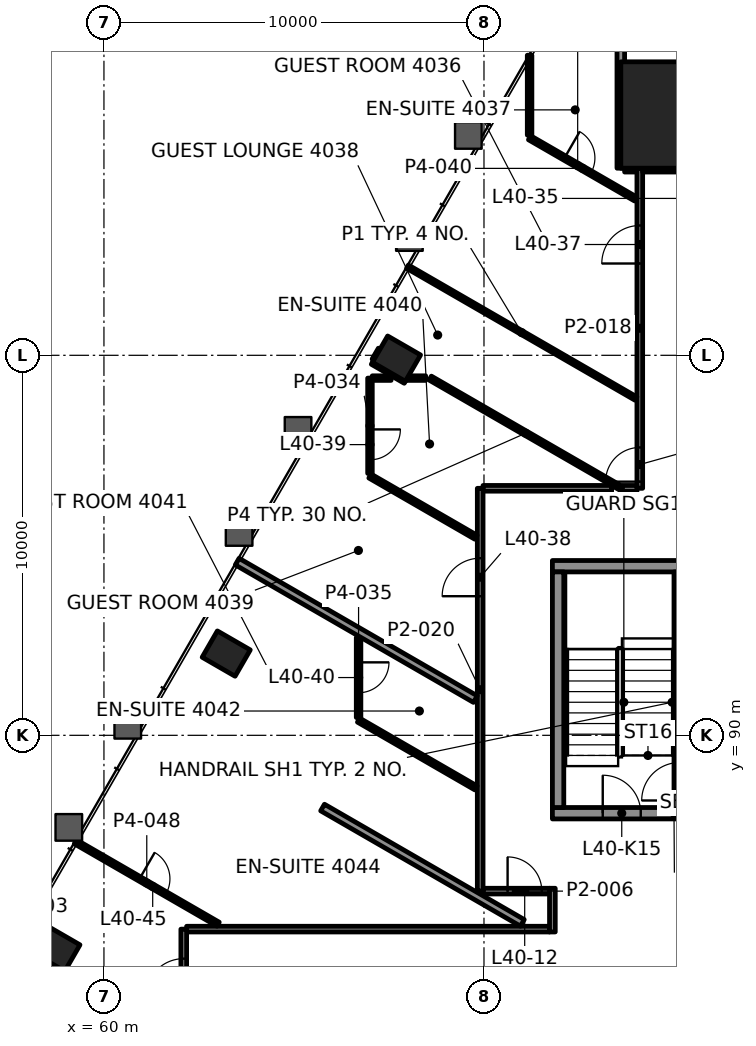
"""IFC4 building model, lengths in metres.
Left out: names, types, materials, properties, quantities, classifications, styles, units other than length and angle.
Written with IfcOpenShell. Run it as: python <this file> out.ifc"""

import sys

from ifc_helpers import new_model, si_unit, direction, frame, frame_2d, origin, origin_2d, place, context, subcontext, project, spatial, rectangle, hollow_rectangle, extrude, element, fill, save


model = new_model("IFC4")
c1 = context("Model", 3, precision=1e-05, world=origin(), true_north=direction((0.0, 1.0)))
c2 = subcontext(c1, "Body", "Model", "MODEL_VIEW")
j1 = project(units=[si_unit("LENGTHUNIT", "METRE"), si_unit("PLANEANGLEUNIT", "RADIAN")], contexts=[c1])
p1 = place(None, origin())
s1 = spatial("IfcSite", under=j1, at=p1, CompositionType="ELEMENT")
p2 = place(p1, origin())
s2 = spatial("IfcBuilding", under=s1, at=p2, CompositionType="ELEMENT")
p3 = place(p2, frame((0.0, 0.0, 175.3)))
s3 = spatial("IfcBuildingStorey", under=s2, at=p3, CompositionType="ELEMENT", Elevation=175.3)
p4 = place(p3, frame((75.0, 106.323, 0.0), z_axis=(0.0, 0.0, 1.0), x_axis=(-1.0, 0.0, 0.0)))
e1 = element("IfcColumn", 1, at=p4, inside=s3, PredefinedType="COLUMN", context=c2, shape_type="SweptSolid", body=[
    extrude(rectangle(XDim=2.8, YDim=2.8, at=origin_2d()), origin(), (0.0, 0.0, 1.0), 3.9),
])
for number, where, z_axis, x_axis in (
    (2, (67.698, 99.912, -0.0), (0.0, 0.0, 1.0), (-0.5, -0.866, 0.0)),
    (3, (63.218, 92.151, -0.0), (0.0, 0.0, 1.0), (-0.5, -0.866, 0.0)),
    (4, (58.737, 84.39, -0.0), (0.0, 0.0, 1.0), (-0.5, -0.866, 0.0)),
):
    element("IfcColumn", number, at=place(p3, frame(where, z_axis=z_axis, x_axis=x_axis)), inside=s3, PredefinedType="COLUMN", context=c2, shape_type="SweptSolid", body=[
        extrude(hollow_rectangle(XDim=0.8, YDim=1.0, WallThickness=0.05, at=origin_2d()), origin(), (0.0, 0.0, 1.0), 3.9),
    ])
p5 = place(p3, frame((71.8, 87.95, 0.0), z_axis=(0.0, 0.0, 1.0), x_axis=(1.0, 0.0, 0.0)))
e5 = element("IfcWall", 5, at=p5, inside=s3, PredefinedType="SHEAR", context=c2, shape_type="SweptSolid", body=[
    extrude(rectangle(XDim=6.4, YDim=0.3, at=frame_2d((3.2, 0.0))), origin(), (0.0, 0.0, 1.0), 3.7),
])
p6 = place(p5, frame((1.325, 0.0, 0.0)))
e6 = element("IfcOpeningElement", 6, at=p6, cuts=e5, PredefinedType="OPENING", context=c2, shape_type="SweptSolid", body=[
    extrude(rectangle(XDim=1.0, YDim=2.1, at=frame_2d((0.5, 1.05))), frame((0.0, 0.16, 0.0), z_axis=(0.0, -1.0, 0.0), x_axis=(1.0, 0.0, 0.0)), (0.0, 0.0, 1.0), 0.32),
])
p7 = place(p5, frame((4.125, 0.0, 0.0)))
e7 = element("IfcOpeningElement", 7, at=p7, cuts=e5, PredefinedType="OPENING", context=c2, shape_type="SweptSolid", body=[
    extrude(rectangle(XDim=1.2, YDim=2.1, at=frame_2d((0.6, 1.05))), frame((0.0, 0.16, 0.0), z_axis=(0.0, -1.0, 0.0), x_axis=(1.0, 0.0, 0.0)), (0.0, 0.0, 1.0), 0.32),
])
p8 = place(p3, frame((71.8, 94.45, 0.0), z_axis=(0.0, 0.0, 1.0), x_axis=(1.0, 0.0, 0.0)))
e8 = element("IfcWall", 8, at=p8, inside=s3, PredefinedType="SHEAR", context=c2, shape_type="SweptSolid", body=[
    extrude(rectangle(XDim=6.4, YDim=0.3, at=frame_2d((3.2, 0.0))), origin(), (0.0, 0.0, 1.0), 3.7),
])
p9 = place(p3, frame((71.95, 88.1, 0.0), z_axis=(0.0, 0.0, 1.0), x_axis=(0.0, 1.0, 0.0)))
e9 = element("IfcWall", 9, at=p9, inside=s3, PredefinedType="SHEAR", context=c2, shape_type="SweptSolid", body=[
    extrude(rectangle(XDim=6.2, YDim=0.3, at=frame_2d((3.1, 0.0))), origin(), (0.0, 0.0, 1.0), 3.7),
])
p10 = place(p3, frame((75.15, 88.1, 0.0), z_axis=(0.0, 0.0, 1.0), x_axis=(0.0, 1.0, 0.0)))
e10 = element("IfcWall", 10, at=p10, inside=s3, PredefinedType="SHEAR", context=c2, shape_type="SweptSolid", body=[
    extrude(rectangle(XDim=6.2, YDim=0.3, at=frame_2d((3.1, 0.0))), origin(), (0.0, 0.0, 1.0), 3.7),
])
p11 = place(p10, frame((0.185, 0.0, 0.0)))
e11 = element("IfcOpeningElement", 11, at=p11, cuts=e10, PredefinedType="OPENING", context=c2, shape_type="SweptSolid", body=[
    extrude(rectangle(XDim=1.0, YDim=2.1, at=frame_2d((0.5, 1.05))), frame((0.0, 0.16, 0.0), z_axis=(0.0, -1.0, 0.0), x_axis=(1.0, 0.0, 0.0)), (0.0, 0.0, 1.0), 0.32),
])
p12 = place(p3, frame((62.176, 84.9, 0.0), z_axis=(0.0, 0.0, 1.0), x_axis=(1.0, 0.0, 0.0)))
e12 = element("IfcWall", 12, at=p12, inside=s3, PredefinedType="PARTITIONING", context=c2, shape_type="SweptSolid", body=[
    extrude(rectangle(XDim=9.55, YDim=0.15, at=frame_2d((4.775, 0.0))), origin(), (0.0, 0.0, 1.0), 3.1),
])
p13 = place(p3, frame((69.976, 85.9, 0.0), z_axis=(0.0, 0.0, 1.0), x_axis=(1.0, 0.0, 0.0)))
e13 = element("IfcWall", 13, at=p13, inside=s3, PredefinedType="PARTITIONING", context=c2, shape_type="SweptSolid", body=[
    extrude(rectangle(XDim=1.75, YDim=0.15, at=frame_2d((0.875, 0.0))), origin(), (0.0, 0.0, 1.0), 3.1),
])
p14 = place(p13, frame((0.646, 0.0, 0.0)))
e14 = element("IfcOpeningElement", 14, at=p14, cuts=e13, PredefinedType="OPENING", context=c2, shape_type="SweptSolid", body=[
    extrude(rectangle(XDim=0.9, YDim=2.1, at=frame_2d((0.45, 1.05))), frame((0.0, 0.085, 0.0), z_axis=(0.0, -1.0, 0.0), x_axis=(1.0, 0.0, 0.0)), (0.0, 0.0, 1.0), 0.17),
])
p15 = place(p3, frame((69.975, 96.5, 0.0), z_axis=(0.0, 0.0, 1.0), x_axis=(1.0, 0.0, 0.0)))
e15 = element("IfcWall", 15, at=p15, inside=s3, PredefinedType="PARTITIONING", context=c2, shape_type="SweptSolid", body=[
    extrude(rectangle(XDim=3.384, YDim=0.15, at=frame_2d((1.692, 0.0))), origin(), (0.0, 0.0, 1.0), 3.1),
])
p16 = place(p3, frame((67.06, 99.4, 0.0), z_axis=(0.0, 0.0, 1.0), x_axis=(1.0, 0.0, 0.0)))
e16 = element("IfcWall", 16, at=p16, inside=s3, PredefinedType="PARTITIONING", context=c2, shape_type="SweptSolid", body=[
    extrude(rectangle(XDim=0.496, YDim=0.12, at=frame_2d((0.248, 0.0))), origin(), (0.0, 0.0, 1.0), 3.022),
])
p17 = place(p3, frame((67.98, 99.4, 0.0), z_axis=(0.0, 0.0, 1.0), x_axis=(1.0, 0.0, 0.0)))
e17 = element("IfcWall", 17, at=p17, inside=s3, PredefinedType="PARTITIONING", context=c2, shape_type="SweptSolid", body=[
    extrude(rectangle(XDim=0.486, YDim=0.12, at=frame_2d((0.243, 0.0))), origin(), (0.0, 0.0, 1.0), 3.1),
])
p18 = place(p3, frame((73.7, 104.923, 0.0), z_axis=(0.0, 0.0, 1.0), x_axis=(1.0, 0.0, 0.0)))
e18 = element("IfcWall", 18, at=p18, inside=s3, PredefinedType="PARTITIONING", context=c2, shape_type="SweptSolid", body=[
    extrude(rectangle(XDim=0.324, YDim=0.2, at=frame_2d((0.162, 0.0))), origin(), (0.0, 0.0, 1.0), 3.1),
])
p19 = place(p3, frame((67.1, 99.877, 0.0), z_axis=(0.0, 0.0, 1.0), x_axis=(0.500277597875, 0.865865073245, 0.0)))
e19 = element("IfcWall", 19, at=p19, inside=s3, PredefinedType="PARTITIONING", context=c2, shape_type="SweptSolid", body=[
    extrude(rectangle(XDim=0.33, YDim=0.1, at=frame_2d((0.165, 0.0))), origin(), (0.0, 0.0, 1.0), 3.1),
])
p20 = place(p3, frame((74.1, 96.5, 0.0), z_axis=(0.0, 0.0, 1.0), x_axis=(0.0, 1.0, 0.0)))
e20 = element("IfcWall", 20, at=p20, inside=s3, PredefinedType="PARTITIONING", context=c2, shape_type="SweptSolid", body=[
    extrude(rectangle(XDim=8.424, YDim=0.15, at=frame_2d((4.212, 0.0))), origin(), (0.0, 0.0, 1.0), 3.1),
])
p21 = place(p20, frame((0.175, 0.0, 0.0)))
e21 = element("IfcOpeningElement", 21, at=p21, cuts=e20, PredefinedType="OPENING", context=c2, shape_type="SweptSolid", body=[
    extrude(rectangle(XDim=0.9, YDim=2.1, at=frame_2d((0.45, 1.05))), frame((0.0, 0.085, 0.0), z_axis=(0.0, -1.0, 0.0), x_axis=(1.0, 0.0, 0.0)), (0.0, 0.0, 1.0), 0.17),
])
p22 = place(p20, frame((5.916, 0.0, 0.0)))
e22 = element("IfcOpeningElement", 22, at=p22, cuts=e20, PredefinedType="OPENING", context=c2, shape_type="SweptSolid", body=[
    extrude(rectangle(XDim=1.0, YDim=2.1, at=frame_2d((0.5, 1.05))), frame((0.0, 0.085, 0.0), z_axis=(0.0, -1.0, 0.0), x_axis=(1.0, 0.0, 0.0)), (0.0, 0.0, 1.0), 0.17),
])
p23 = place(p3, frame((73.6, 104.924, 0.0), z_axis=(0.0, 0.0, 1.0), x_axis=(0.0, 1.0, 0.0)))
e23 = element("IfcWall", 23, at=p23, inside=s3, PredefinedType="PARTITIONING", context=c2, shape_type="SweptSolid", body=[
    extrude(rectangle(XDim=3.26, YDim=0.2, at=frame_2d((1.63, 0.0))), origin(), (0.0, 0.0, 1.0), 3.1),
])
p24 = place(p3, frame((71.8, 84.825, 0.0), z_axis=(0.0, 0.0, 1.0), x_axis=(0.0, 1.0, 0.0)))
e24 = element("IfcWall", 24, at=p24, inside=s3, PredefinedType="PARTITIONING", context=c2, shape_type="SweptSolid", body=[
    extrude(rectangle(XDim=1.15, YDim=0.15, at=frame_2d((0.575, 0.0))), origin(), (0.0, 0.0, 1.0), 3.1),
])
p25 = place(p3, frame((71.2, 105.794, 0.0), z_axis=(0.0, 0.0, 1.0), x_axis=(0.0, 1.0, 0.0)))
e25 = element("IfcWall", 25, at=p25, inside=s3, PredefinedType="PARTITIONING", context=c2, shape_type="SweptSolid", body=[
    extrude(rectangle(XDim=2.103, YDim=0.12, at=frame_2d((1.052, 0.0))), origin(), (0.0, 0.0, 1.0), 3.1),
])
p26 = place(p3, frame((69.9, 85.9, 0.0), z_axis=(0.0, 0.0, 1.0), x_axis=(0.0, 1.0, 0.0)))
e26 = element("IfcWall", 26, at=p26, inside=s3, PredefinedType="PARTITIONING", context=c2, shape_type="SweptSolid", body=[
    extrude(rectangle(XDim=10.6, YDim=0.15, at=frame_2d((5.3, 0.0))), origin(), (0.0, 0.0, 1.0), 3.022),
])
p27 = place(p26, frame((7.76, 0.0, 0.0)))
e27 = element("IfcOpeningElement", 27, at=p27, cuts=e26, PredefinedType="OPENING", context=c2, shape_type="SweptSolid", body=[
    extrude(rectangle(XDim=1.0, YDim=2.1, at=frame_2d((0.5, 1.05))), frame((0.0, 0.085, 0.0), z_axis=(0.0, -1.0, 0.0), x_axis=(1.0, 0.0, 0.0)), (0.0, 0.0, 1.0), 0.17),
])
p28 = place(p3, frame((67.0, 99.4, 0.0), z_axis=(0.0, 0.0, 1.0), x_axis=(0.0, -1.0, 0.0)))
e28 = element("IfcWall", 28, at=p28, inside=s3, PredefinedType="PARTITIONING", context=c2, shape_type="SweptSolid", body=[
    extrude(rectangle(XDim=2.508, YDim=0.12, at=frame_2d((1.254, 0.0))), origin(), (0.0, 0.0, 1.0), 3.022),
])
p29 = place(p28, frame((1.35, 0.0, 0.0)))
e29 = element("IfcOpeningElement", 29, at=p29, cuts=e28, PredefinedType="OPENING", context=c2, shape_type="SweptSolid", body=[
    extrude(rectangle(XDim=0.8, YDim=2.1, at=frame_2d((0.4, 1.05))), frame((0.0, 0.07, 0.0), z_axis=(0.0, -1.0, 0.0), x_axis=(1.0, 0.0, 0.0)), (0.0, 0.0, 1.0), 0.14),
])
p30 = place(p3, frame((66.7, 92.572, 0.0), z_axis=(0.0, 0.0, 1.0), x_axis=(0.0, -1.0, 0.0)))
e30 = element("IfcWall", 30, at=p30, inside=s3, PredefinedType="PARTITIONING", context=c2, shape_type="SweptSolid", body=[
    extrude(rectangle(XDim=2.104, YDim=0.12, at=frame_2d((1.052, 0.0))), origin(), (0.0, 0.0, 1.0), 3.1),
])
p31 = place(p30, frame((0.652, 0.0, 0.0)))
e31 = element("IfcOpeningElement", 31, at=p31, cuts=e30, PredefinedType="OPENING", context=c2, shape_type="SweptSolid", body=[
    extrude(rectangle(XDim=0.8, YDim=2.1, at=frame_2d((0.4, 1.05))), frame((0.0, 0.07, 0.0), z_axis=(0.0, -1.0, 0.0), x_axis=(1.0, 0.0, 0.0)), (0.0, 0.0, 1.0), 0.14),
])
p32 = place(p3, frame((62.1, 68.591, 0.0), z_axis=(0.0, 0.0, 1.0), x_axis=(0.0, 1.0, 0.0)))
e32 = element("IfcWall", 32, at=p32, inside=s3, PredefinedType="PARTITIONING", context=c2, shape_type="SweptSolid", body=[
    extrude(rectangle(XDim=16.308, YDim=0.15, at=frame_2d((8.154, 0.0))), origin(), (0.0, 0.0, 1.0), 3.1),
])
p33 = place(p32, frame((4.999, 0.0, 0.0)))
e33 = element("IfcOpeningElement", 33, at=p33, cuts=e32, PredefinedType="OPENING", context=c2, shape_type="SweptSolid", body=[
    extrude(rectangle(XDim=0.9, YDim=2.1, at=frame_2d((0.45, 1.05))), frame((0.0, 0.085, 0.0), z_axis=(0.0, -1.0, 0.0), x_axis=(1.0, 0.0, 0.0)), (0.0, 0.0, 1.0), 0.17),
])
p34 = place(p32, frame((8.879, 0.0, 0.0)))
e34 = element("IfcOpeningElement", 34, at=p34, cuts=e32, PredefinedType="OPENING", context=c2, shape_type="SweptSolid", body=[
    extrude(rectangle(XDim=0.9, YDim=2.1, at=frame_2d((0.45, 1.05))), frame((0.0, 0.085, 0.0), z_axis=(0.0, -1.0, 0.0), x_axis=(1.0, 0.0, 0.0)), (0.0, 0.0, 1.0), 0.17),
])
p35 = place(p32, frame((14.532, 0.0, 0.0)))
e35 = element("IfcOpeningElement", 35, at=p35, cuts=e32, PredefinedType="OPENING", context=c2, shape_type="SweptSolid", body=[
    extrude(rectangle(XDim=1.0, YDim=2.1, at=frame_2d((0.5, 1.05))), frame((0.0, 0.085, 0.0), z_axis=(0.0, -1.0, 0.0), x_axis=(1.0, 0.0, 0.0)), (0.0, 0.0, 1.0), 0.17),
])
p36 = place(p3, frame((71.2, 105.724, 0.0), z_axis=(0.0, 0.0, 1.0), x_axis=(0.86604299788, -0.499969524894, 0.0)))
e36 = element("IfcWall", 36, at=p36, inside=s3, PredefinedType="PARTITIONING", context=c2, shape_type="SweptSolid", body=[
    extrude(rectangle(XDim=3.222, YDim=0.12, at=frame_2d((1.611, 0.0))), origin(), (0.0, 0.0, 1.0), 3.1),
])
p37 = place(p36, frame((1.061, 0.0, 0.0)))
e37 = element("IfcOpeningElement", 37, at=p37, cuts=e36, PredefinedType="OPENING", context=c2, shape_type="SweptSolid", body=[
    extrude(rectangle(XDim=0.8, YDim=2.1, at=frame_2d((0.4, 1.05))), frame((0.0, 0.07, 0.0), z_axis=(0.0, -1.0, 0.0), x_axis=(1.0, 0.0, 0.0)), (0.0, 0.0, 1.0), 0.14),
])
p38 = place(p3, frame((73.999, 98.862, 0.0), z_axis=(0.0, 0.0, 1.0), x_axis=(-0.866026860931, 0.49999747614, 0.0)))
e38 = element("IfcWall", 38, at=p38, inside=s3, PredefinedType="PARTITIONING", context=c2, shape_type="SweptSolid", body=[
    extrude(rectangle(XDim=6.941, YDim=0.1, at=frame_2d((3.471, 0.0))), origin(), (0.0, 0.0, 1.0), 3.1),
])
p39 = place(p3, frame((73.609, 96.5, 0.0), z_axis=(0.0, 0.0, 1.0), x_axis=(-0.866032775405, 0.499987231761, 0.0)))
e39 = element("IfcWall", 39, at=p39, inside=s3, PredefinedType="PARTITIONING", context=c2, shape_type="SweptSolid", body=[
    extrude(rectangle(XDim=5.8, YDim=0.12, at=frame_2d((2.9, 0.0))), origin(), (0.0, 0.0, 1.0), 3.1),
])
p40 = place(p3, frame((67.932, 99.316, 0.0), z_axis=(0.0, 0.0, 1.0), x_axis=(-0.866010750942, 0.50002537861, 0.0)))
e40 = element("IfcWall", 40, at=p40, inside=s3, PredefinedType="PARTITIONING", context=c2, shape_type="SweptSolid", body=[
    extrude(rectangle(XDim=1.0, YDim=0.12, at=frame_2d((0.5, 0.0))), origin(), (0.0, 0.0, 1.0), 3.022),
])
p41 = place(p3, frame((69.79, 95.212, 0.0), z_axis=(0.0, 0.0, 1.0), x_axis=(-0.86604299788, 0.499969524894, 0.0)))
e41 = element("IfcWall", 41, at=p41, inside=s3, PredefinedType="PARTITIONING", context=c2, shape_type="SweptSolid", body=[
    extrude(rectangle(XDim=3.222, YDim=0.12, at=frame_2d((1.611, 0.0))), origin(), (0.0, 0.0, 1.0), 3.1),
])
p42 = place(p3, frame((69.773, 90.953, 0.0), z_axis=(0.0, 0.0, 1.0), x_axis=(-0.866025463095, 0.499999897272, 0.0)))
e42 = element("IfcWall", 42, at=p42, inside=s3, PredefinedType="PARTITIONING", context=c2, shape_type="SweptSolid", body=[
    extrude(rectangle(XDim=7.236, YDim=0.2, at=frame_2d((3.618, 0.0))), origin(), (0.0, 0.0, 1.0), 3.022),
])
p43 = place(p3, frame((69.791, 88.615, 0.0), z_axis=(0.0, 0.0, 1.0), x_axis=(-0.866045460162, 0.499965259726, 0.0)))
e43 = element("IfcWall", 43, at=p43, inside=s3, PredefinedType="PARTITIONING", context=c2, shape_type="SweptSolid", body=[
    extrude(rectangle(XDim=3.569, YDim=0.12, at=frame_2d((1.784, 0.0))), origin(), (0.0, 0.0, 1.0), 3.1),
])
p44 = place(p3, frame((71.01, 85.065, 0.0), z_axis=(0.0, 0.0, 1.0), x_axis=(-0.866024161028, 0.500002152512, 0.0)))
e44 = element("IfcWall", 44, at=p44, inside=s3, PredefinedType="PARTITIONING", context=c2, shape_type="SweptSolid", body=[
    extrude(rectangle(XDim=6.07, YDim=0.2, at=frame_2d((3.035, 0.0))), origin(), (0.0, 0.0, 1.0), 3.1),
])
p45 = place(p3, frame((59.249, 87.198, 0.0), z_axis=(0.0, 0.0, 1.0), x_axis=(0.866006496088, -0.50003274766, 0.0)))
e45 = element("IfcWall", 45, at=p45, inside=s3, PredefinedType="PARTITIONING", context=c2, shape_type="SweptSolid", body=[
    extrude(rectangle(XDim=4.336, YDim=0.12, at=frame_2d((2.168, 0.0))), origin(), (0.0, 0.0, 1.0), 3.022),
])
p46 = place(p45, frame((1.948, 0.0, 0.0)))
e46 = element("IfcOpeningElement", 46, at=p46, cuts=e45, PredefinedType="OPENING", context=c2, shape_type="SweptSolid", body=[
    extrude(rectangle(XDim=0.8, YDim=2.1, at=frame_2d((0.4, 1.05))), frame((0.0, 0.07, 0.0), z_axis=(0.0, -1.0, 0.0), x_axis=(1.0, 0.0, 0.0)), (0.0, 0.0, 1.0), 0.14),
])
p47 = place(p3, frame((73.639, 96.5, 0.0), z_axis=(0.0, 0.0, 1.0), x_axis=(1.0, 0.0, 0.0)))
e47 = element("IfcWall", 47, at=p47, inside=s3, PredefinedType="PARTITIONING", context=c2, shape_type="SweptSolid", body=[
    extrude(rectangle(XDim=0.386, YDim=0.15, at=frame_2d((0.193, 0.0))), origin(), (0.0, 0.0, 1.0), 3.1),
])
p48 = place(p3, frame((74.175, 104.923, 0.0), z_axis=(0.0, 0.0, 1.0), x_axis=(1.0, 0.0, 0.0)))
e48 = element("IfcWall", 48, at=p48, inside=s3, PredefinedType="PARTITIONING", context=c2, shape_type="SweptSolid", body=[
    extrude(rectangle(XDim=1.649, YDim=0.2, at=frame_2d((0.825, 0.0))), origin(), (0.0, 0.0, 1.0), 3.097),
])
p49 = place(p14, origin())
e49 = element("IfcDoor", 49, at=p49, inside=s3, OperationType="SINGLE_SWING_RIGHT", PredefinedType="DOOR", context=c2, shape_type="SweptSolid", body=[
    extrude(rectangle(XDim=0.9, YDim=2.1, at=frame_2d((0.45, 1.05))), frame((0.0, 0.025, 0.0), z_axis=(0.0, -1.0, 0.0), x_axis=(1.0, 0.0, 0.0)), (0.0, 0.0, 1.0), 0.05),
])
fill(e14, e49)
p50 = place(p21, origin())
e50 = element("IfcDoor", 50, at=p50, inside=s3, OperationType="SINGLE_SWING_LEFT", PredefinedType="DOOR", context=c2, shape_type="SweptSolid", body=[
    extrude(rectangle(XDim=0.9, YDim=2.1, at=frame_2d((0.45, 1.05))), frame((0.0, 0.025, 0.0), z_axis=(0.0, -1.0, 0.0), x_axis=(1.0, 0.0, 0.0)), (0.0, 0.0, 1.0), 0.05),
])
fill(e21, e50)
p51 = place(p22, origin())
e51 = element("IfcDoor", 51, at=p51, inside=s3, OperationType="SINGLE_SWING_LEFT", PredefinedType="DOOR", context=c2, shape_type="SweptSolid", body=[
    extrude(rectangle(XDim=1.0, YDim=2.1, at=frame_2d((0.5, 1.05))), frame((0.0, 0.025, 0.0), z_axis=(0.0, -1.0, 0.0), x_axis=(1.0, 0.0, 0.0)), (0.0, 0.0, 1.0), 0.05),
])
fill(e22, e51)
p52 = place(p27, origin())
e52 = element("IfcDoor", 52, at=p52, inside=s3, OperationType="SINGLE_SWING_RIGHT", PredefinedType="DOOR", context=c2, shape_type="SweptSolid", body=[
    extrude(rectangle(XDim=1.0, YDim=2.1, at=frame_2d((0.5, 1.05))), frame((0.0, 0.025, 0.0), z_axis=(0.0, -1.0, 0.0), x_axis=(1.0, 0.0, 0.0)), (0.0, 0.0, 1.0), 0.05),
])
fill(e27, e52)
p53 = place(p29, origin())
e53 = element("IfcDoor", 53, at=p53, inside=s3, OperationType="SINGLE_SWING_RIGHT", PredefinedType="DOOR", context=c2, shape_type="SweptSolid", body=[
    extrude(rectangle(XDim=0.8, YDim=2.1, at=frame_2d((0.4, 1.05))), frame((0.0, 0.025, 0.0), z_axis=(0.0, -1.0, 0.0), x_axis=(1.0, 0.0, 0.0)), (0.0, 0.0, 1.0), 0.05),
])
fill(e29, e53)
p54 = place(p31, origin())
e54 = element("IfcDoor", 54, at=p54, inside=s3, OperationType="SINGLE_SWING_RIGHT", PredefinedType="DOOR", context=c2, shape_type="SweptSolid", body=[
    extrude(rectangle(XDim=0.8, YDim=2.1, at=frame_2d((0.4, 1.05))), frame((0.0, 0.025, 0.0), z_axis=(0.0, -1.0, 0.0), x_axis=(1.0, 0.0, 0.0)), (0.0, 0.0, 1.0), 0.05),
])
fill(e31, e54)
p55 = place(p35, origin())
e55 = element("IfcDoor", 55, at=p55, inside=s3, OperationType="SINGLE_SWING_RIGHT", PredefinedType="DOOR", context=c2, shape_type="SweptSolid", body=[
    extrude(rectangle(XDim=1.0, YDim=2.1, at=frame_2d((0.5, 1.05))), frame((0.0, 0.025, 0.0), z_axis=(0.0, -1.0, 0.0), x_axis=(1.0, 0.0, 0.0)), (0.0, 0.0, 1.0), 0.05),
])
fill(e35, e55)
p56 = place(p37, origin())
e56 = element("IfcDoor", 56, at=p56, inside=s3, OperationType="SINGLE_SWING_LEFT", PredefinedType="DOOR", context=c2, shape_type="SweptSolid", body=[
    extrude(rectangle(XDim=0.8, YDim=2.1, at=frame_2d((0.4, 1.05))), frame((0.0, 0.025, 0.0), z_axis=(0.0, -1.0, 0.0), x_axis=(1.0, 0.0, 0.0)), (0.0, 0.0, 1.0), 0.05),
])
fill(e37, e56)
p57 = place(p46, origin())
e57 = element("IfcDoor", 57, at=p57, inside=s3, OperationType="SINGLE_SWING_RIGHT", PredefinedType="DOOR", context=c2, shape_type="SweptSolid", body=[
    extrude(rectangle(XDim=0.8, YDim=2.1, at=frame_2d((0.4, 1.05))), frame((0.0, 0.025, 0.0), z_axis=(0.0, -1.0, 0.0), x_axis=(1.0, 0.0, 0.0)), (0.0, 0.0, 1.0), 0.05),
])
fill(e46, e57)
p58 = place(p6, origin())
e58 = element("IfcDoor", 58, at=p58, inside=s3, OperationType="SINGLE_SWING_RIGHT", PredefinedType="DOOR", context=c2, shape_type="SweptSolid", body=[
    extrude(rectangle(XDim=1.0, YDim=2.1, at=frame_2d((0.5, 1.05))), frame((0.0, 0.025, 0.0), z_axis=(0.0, -1.0, 0.0), x_axis=(1.0, 0.0, 0.0)), (0.0, 0.0, 1.0), 0.05),
])
fill(e6, e58)
save(model, sys.argv[1])
